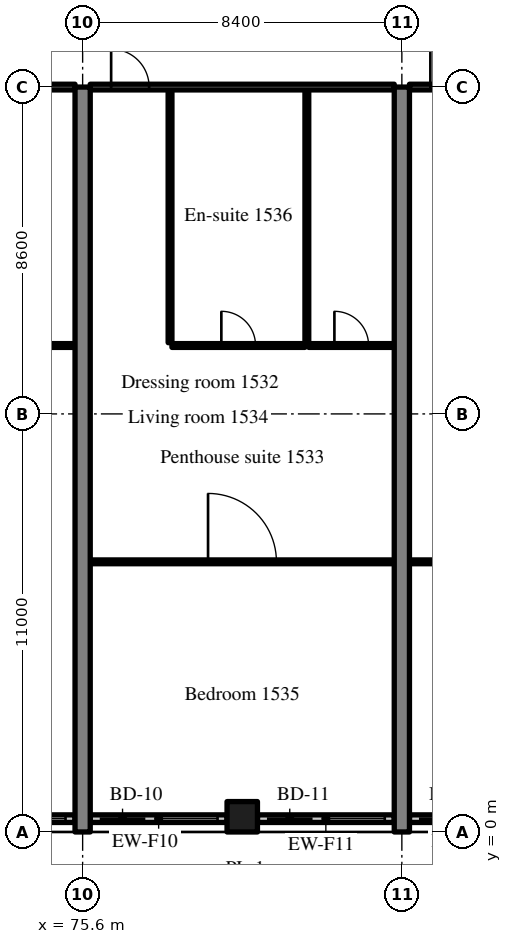
"""IFC4 building model, lengths in metres.
Left out: names, types, materials, properties, quantities, classifications, styles, units other than length and angle.
Written with IfcOpenShell. Run it as: python <this file> out.ifc"""

import sys

from ifc_helpers import new_model, si_unit, direction, frame, frame_2d, origin, origin_2d, place, context, subcontext, project, spatial, rectangle, extrude, source, transform, mapped, element, fill, save


model = new_model("IFC4")
c1 = context("Model", 3, precision=1e-05, world=origin(), true_north=direction((0.0, 1.0)))
c2 = subcontext(c1, "Body", "Model", "MODEL_VIEW")
j1 = project(units=[si_unit("LENGTHUNIT", "METRE"), si_unit("PLANEANGLEUNIT", "RADIAN")], contexts=[c1])
p1 = place(None, origin())
s1 = spatial("IfcSite", under=j1, at=p1, CompositionType="ELEMENT")
p2 = place(p1, origin())
s2 = spatial("IfcBuilding", under=s1, at=p2, CompositionType="ELEMENT")
p3 = place(p2, frame((0.0, 0.0, 65.8)))
s3 = spatial("IfcBuildingStorey", under=s2, at=p3, CompositionType="ELEMENT", Elevation=65.8)
m1 = source(origin(), c2, "Body", "SweptSolid", [
    extrude(rectangle(XDim=19.6, YDim=0.4, at=frame_2d((9.8, 0.0))), origin(), (0.0, 0.0, 1.0), 3.52),
])
for number, where, z_axis, x_axis in (
    (1, (75.6, 0.0, 0.0), (0.0, 0.0, 1.0), (0.0, 1.0, 0.0)),
    (2, (84.0, 0.0, 0.0), (0.0, 0.0, 1.0), (0.0, 1.0, 0.0)),
):
    element("IfcWall", number, at=place(p3, frame(where, z_axis=z_axis, x_axis=x_axis)), inside=s3, PredefinedType="SHEAR", context=c2, shape_type="MappedRepresentation", body=[
        mapped(m1, transform((0.0, 0.0, 0.0), scale=1.0)),
    ])
m2 = source(origin(), c2, "Body", "SweptSolid", [
    extrude(rectangle(XDim=0.8, YDim=0.8, at=origin_2d()), origin(), (0.0, 0.0, 1.0), 3.52),
])
p4 = place(p3, frame((79.8, 0.4, 0.0), z_axis=(0.0, 0.0, 1.0), x_axis=(1.0, 0.0, 0.0)))
e3 = element("IfcColumn", 3, at=p4, inside=s3, PredefinedType="COLUMN", context=c2, shape_type="MappedRepresentation", body=[
    mapped(m2, transform((0.0, 0.0, 0.0), scale=1.0)),
])
m3 = source(origin(), c2, "Body", "SweptSolid", [
    extrude(rectangle(XDim=3.6, YDim=0.2, at=frame_2d((1.8, 0.0))), origin(), (0.0, 0.0, 1.0), 2.82),
])
p5 = place(p3, frame((71.8, 0.35, 0.0), z_axis=(0.0, 0.0, 1.0), x_axis=(1.0, 0.0, 0.0)))
e4 = element("IfcWall", 4, at=p5, inside=s3, PredefinedType="SOLIDWALL", context=c2, shape_type="MappedRepresentation", body=[
    mapped(m3, transform((0.0, 0.0, 0.0), scale=1.0)),
])
m4 = source(origin(), c2, "Body", "SweptSolid", [
    extrude(rectangle(XDim=1.2, YDim=2.4, at=frame_2d((0.6, 1.2))), frame((0.0, 0.11, 0.0), z_axis=(0.0, -1.0, 0.0), x_axis=(1.0, 0.0, 0.0)), (0.0, 0.0, 1.0), 0.22),
])
p6 = place(p5, frame((0.25, 0.0, 0.0)))
e5 = element("IfcOpeningElement", 5, at=p6, cuts=e4, PredefinedType="OPENING", context=c2, shape_type="MappedRepresentation", body=[
    mapped(m4, transform((0.0, 0.0, 0.0), scale=1.0)),
])
m5 = source(origin(), c2, "Body", "SweptSolid", [
    extrude(rectangle(XDim=1.5, YDim=1.5, at=frame_2d((0.75, 0.75))), frame((0.0, 0.11, 0.0), z_axis=(0.0, -1.0, 0.0), x_axis=(1.0, 0.0, 0.0)), (0.0, 0.0, 1.0), 0.22),
])
p7 = place(p5, frame((1.85, 0.0, 0.9)))
e6 = element("IfcOpeningElement", 6, at=p7, cuts=e4, PredefinedType="OPENING", context=c2, shape_type="MappedRepresentation", body=[
    mapped(m5, transform((0.0, 0.0, 0.0), scale=1.0)),
])
p8 = place(p3, frame((75.8, 0.35, 0.0), z_axis=(0.0, 0.0, 1.0), x_axis=(1.0, 0.0, 0.0)))
e7 = element("IfcWall", 7, at=p8, inside=s3, PredefinedType="SOLIDWALL", context=c2, shape_type="MappedRepresentation", body=[
    mapped(m3, transform((0.0, 0.0, 0.0), scale=1.0)),
])
p9 = place(p8, frame((0.25, 0.0, 0.0)))
e8 = element("IfcOpeningElement", 8, at=p9, cuts=e7, PredefinedType="OPENING", context=c2, shape_type="MappedRepresentation", body=[
    mapped(m4, transform((0.0, 0.0, 0.0), scale=1.0)),
])
p10 = place(p8, frame((1.85, 0.0, 0.9)))
e9 = element("IfcOpeningElement", 9, at=p10, cuts=e7, PredefinedType="OPENING", context=c2, shape_type="MappedRepresentation", body=[
    mapped(m5, transform((0.0, 0.0, 0.0), scale=1.0)),
])
m6 = source(origin(), c2, "Body", "SweptSolid", [
    extrude(rectangle(XDim=3.6, YDim=0.2, at=frame_2d((1.8, 0.0))), origin(), (0.0, 0.0, 1.0), 2.82),
])
p11 = place(p3, frame((80.2, 0.35, 0.0), z_axis=(0.0, 0.0, 1.0), x_axis=(1.0, 0.0, 0.0)))
e10 = element("IfcWall", 10, at=p11, inside=s3, PredefinedType="SOLIDWALL", context=c2, shape_type="MappedRepresentation", body=[
    mapped(m6, transform((0.0, 0.0, 0.0), scale=1.0)),
])
p12 = place(p11, frame((0.25, 0.0, 0.0)))
e11 = element("IfcOpeningElement", 11, at=p12, cuts=e10, PredefinedType="OPENING", context=c2, shape_type="MappedRepresentation", body=[
    mapped(m4, transform((0.0, 0.0, 0.0), scale=1.0)),
])
p13 = place(p11, frame((1.85, 0.0, 0.9)))
e12 = element("IfcOpeningElement", 12, at=p13, cuts=e10, PredefinedType="OPENING", context=c2, shape_type="MappedRepresentation", body=[
    mapped(m5, transform((0.0, 0.0, 0.0), scale=1.0)),
])
p14 = place(p3, frame((84.2, 0.35, 0.0), z_axis=(0.0, 0.0, 1.0), x_axis=(1.0, 0.0, 0.0)))
e13 = element("IfcWall", 13, at=p14, inside=s3, PredefinedType="SOLIDWALL", context=c2, shape_type="MappedRepresentation", body=[
    mapped(m6, transform((0.0, 0.0, 0.0), scale=1.0)),
])
p15 = place(p14, frame((0.25, 0.0, 0.0)))
e14 = element("IfcOpeningElement", 14, at=p15, cuts=e13, PredefinedType="OPENING", context=c2, shape_type="MappedRepresentation", body=[
    mapped(m4, transform((0.0, 0.0, 0.0), scale=1.0)),
])
p16 = place(p14, frame((1.85, 0.0, 0.9)))
e15 = element("IfcOpeningElement", 15, at=p16, cuts=e13, PredefinedType="OPENING", context=c2, shape_type="MappedRepresentation", body=[
    mapped(m5, transform((0.0, 0.0, 0.0), scale=1.0)),
])
m7 = source(origin(), c2, "Body", "SweptSolid", [
    extrude(rectangle(XDim=2.25, YDim=0.1, at=frame_2d((1.125, 0.0))), origin(), (0.0, 0.0, 1.0), 3.52),
])
p17 = place(p3, frame((73.15, 12.8, 0.0), z_axis=(0.0, 0.0, 1.0), x_axis=(1.0, 0.0, 0.0)))
e16 = element("IfcWall", 16, at=p17, inside=s3, PredefinedType="PARTITIONING", context=c2, shape_type="MappedRepresentation", body=[
    mapped(m7, transform((0.0, 0.0, 0.0), scale=1.0)),
])
m8 = source(origin(), c2, "Body", "SweptSolid", [
    extrude(rectangle(XDim=0.9, YDim=2.1, at=frame_2d((0.45, 1.05))), frame((0.0, 0.06, 0.0), z_axis=(0.0, -1.0, 0.0), x_axis=(1.0, 0.0, 0.0)), (0.0, 0.0, 1.0), 0.12),
])
p18 = place(p17, frame((0.675, 0.0, 0.0)))
e17 = element("IfcOpeningElement", 17, at=p18, cuts=e16, PredefinedType="OPENING", context=c2, shape_type="MappedRepresentation", body=[
    mapped(m8, transform((0.0, 0.0, 0.0), scale=1.0)),
])
m9 = source(origin(), c2, "Body", "SweptSolid", [
    extrude(rectangle(XDim=8.0, YDim=0.15, at=frame_2d((4.0, 0.0))), origin(), (0.0, 0.0, 1.0), 2.82),
])
p19 = place(p3, frame((67.4, 19.6, 0.0), z_axis=(0.0, 0.0, 1.0), x_axis=(1.0, 0.0, 0.0)))
e18 = element("IfcWall", 18, at=p19, inside=s3, PredefinedType="PARTITIONING", context=c2, shape_type="MappedRepresentation", body=[
    mapped(m9, transform((0.0, 0.0, 0.0), scale=1.0)),
])
m10 = source(origin(), c2, "Body", "SweptSolid", [
    extrude(rectangle(XDim=1.0, YDim=2.1, at=frame_2d((0.5, 1.05))), frame((0.0, 0.085, 0.0), z_axis=(0.0, -1.0, 0.0), x_axis=(1.0, 0.0, 0.0)), (0.0, 0.0, 1.0), 0.17),
])
p20 = place(p19, frame((0.55, 0.0, 0.0)))
e19 = element("IfcOpeningElement", 19, at=p20, cuts=e18, PredefinedType="OPENING", context=c2, shape_type="MappedRepresentation", body=[
    mapped(m10, transform((0.0, 0.0, 0.0), scale=1.0)),
])
m11 = source(origin(), c2, "Body", "SweptSolid", [
    extrude(rectangle(XDim=6.65, YDim=0.1, at=frame_2d((3.325, 0.0))), origin(), (0.0, 0.0, 1.0), 3.52),
])
for number, where, z_axis, x_axis in (
    (20, (77.9, 12.875, 0.0), (0.0, 0.0, 1.0), (0.0, 1.0, 0.0)),
    (21, (81.5, 12.875, 0.0), (0.0, 0.0, 1.0), (0.0, 1.0, 0.0)),
):
    element("IfcWall", number, at=place(p3, frame(where, z_axis=z_axis, x_axis=x_axis)), inside=s3, PredefinedType="PARTITIONING", context=c2, shape_type="MappedRepresentation", body=[
        mapped(m11, transform((0.0, 0.0, 0.0), scale=1.0)),
    ])
m12 = source(origin(), c2, "Body", "SweptSolid", [
    extrude(rectangle(XDim=3.5, YDim=0.1, at=frame_2d((1.75, 0.0))), origin(), (0.0, 0.0, 1.0), 3.52),
])
p21 = place(p3, frame((77.95, 12.8, 0.0), z_axis=(0.0, 0.0, 1.0), x_axis=(1.0, 0.0, 0.0)))
e22 = element("IfcWall", 22, at=p21, inside=s3, PredefinedType="PARTITIONING", context=c2, shape_type="MappedRepresentation", body=[
    mapped(m12, transform((0.0, 0.0, 0.0), scale=1.0)),
])
p22 = place(p21, frame((1.3, 0.0, 0.0)))
e23 = element("IfcOpeningElement", 23, at=p22, cuts=e22, PredefinedType="OPENING", context=c2, shape_type="MappedRepresentation", body=[
    mapped(m8, transform((0.0, 0.0, 0.0), scale=1.0)),
])
p23 = place(p3, frame((81.55, 12.8, 0.0), z_axis=(0.0, 0.0, 1.0), x_axis=(1.0, 0.0, 0.0)))
e24 = element("IfcWall", 24, at=p23, inside=s3, PredefinedType="PARTITIONING", context=c2, shape_type="MappedRepresentation", body=[
    mapped(m7, transform((0.0, 0.0, 0.0), scale=1.0)),
])
p24 = place(p23, frame((0.675, 0.0, 0.0)))
e25 = element("IfcOpeningElement", 25, at=p24, cuts=e24, PredefinedType="OPENING", context=c2, shape_type="MappedRepresentation", body=[
    mapped(m8, transform((0.0, 0.0, 0.0), scale=1.0)),
])
m13 = source(origin(), c2, "Body", "SweptSolid", [
    extrude(rectangle(XDim=8.0, YDim=0.1, at=frame_2d((4.0, 0.0))), origin(), (0.0, 0.0, 1.0), 3.52),
])
p25 = place(p3, frame((75.8, 7.108, 0.0), z_axis=(0.0, 0.0, 1.0), x_axis=(1.0, 0.0, 0.0)))
e26 = element("IfcWall", 26, at=p25, inside=s3, PredefinedType="PARTITIONING", context=c2, shape_type="MappedRepresentation", body=[
    mapped(m13, transform((0.0, 0.0, 0.0), scale=1.0)),
])
m14 = source(origin(), c2, "Body", "SweptSolid", [
    extrude(rectangle(XDim=1.8, YDim=2.1, at=frame_2d((0.9, 1.05))), frame((0.0, 0.06, 0.0), z_axis=(0.0, -1.0, 0.0), x_axis=(1.0, 0.0, 0.0)), (0.0, 0.0, 1.0), 0.12),
])
p26 = place(p25, frame((3.1, 0.0, 0.0)))
e27 = element("IfcOpeningElement", 27, at=p26, cuts=e26, PredefinedType="OPENING", context=c2, shape_type="MappedRepresentation", body=[
    mapped(m14, transform((0.0, 0.0, 0.0), scale=1.0)),
])
p27 = place(p3, frame((75.8, 19.6, 0.0), z_axis=(0.0, 0.0, 1.0), x_axis=(1.0, 0.0, 0.0)))
e28 = element("IfcWall", 28, at=p27, inside=s3, PredefinedType="PARTITIONING", context=c2, shape_type="MappedRepresentation", body=[
    mapped(m9, transform((0.0, 0.0, 0.0), scale=1.0)),
])
p28 = place(p27, frame((0.55, 0.0, 0.0)))
e29 = element("IfcOpeningElement", 29, at=p28, cuts=e28, PredefinedType="OPENING", context=c2, shape_type="MappedRepresentation", body=[
    mapped(m10, transform((0.0, 0.0, 0.0), scale=1.0)),
])
p29 = place(p3, frame((84.2, 7.108, 0.0), z_axis=(0.0, 0.0, 1.0), x_axis=(1.0, 0.0, 0.0)))
e30 = element("IfcWall", 30, at=p29, inside=s3, PredefinedType="PARTITIONING", context=c2, shape_type="MappedRepresentation", body=[
    mapped(m13, transform((0.0, 0.0, 0.0), scale=1.0)),
])
p30 = place(p29, frame((3.1, 0.0, 0.0)))
e31 = element("IfcOpeningElement", 31, at=p30, cuts=e30, PredefinedType="OPENING", context=c2, shape_type="MappedRepresentation", body=[
    mapped(m14, transform((0.0, 0.0, 0.0), scale=1.0)),
])
p31 = place(p3, frame((84.2, 19.6, 0.0), z_axis=(0.0, 0.0, 1.0), x_axis=(1.0, 0.0, 0.0)))
e32 = element("IfcWall", 32, at=p31, inside=s3, PredefinedType="PARTITIONING", context=c2, shape_type="MappedRepresentation", body=[
    mapped(m9, transform((0.0, 0.0, 0.0), scale=1.0)),
])
p32 = place(p31, frame((0.55, 0.0, 0.0)))
e33 = element("IfcOpeningElement", 33, at=p32, cuts=e32, PredefinedType="OPENING", context=c2, shape_type="MappedRepresentation", body=[
    mapped(m10, transform((0.0, 0.0, 0.0), scale=1.0)),
])
m15 = source(origin(), c2, "Body", "SweptSolid", [
    extrude(rectangle(XDim=1.5, YDim=1.5, at=frame_2d((0.75, 0.75))), frame((0.0, 0.03, 0.0), z_axis=(0.0, -1.0, 0.0), x_axis=(1.0, 0.0, 0.0)), (0.0, 0.0, 1.0), 0.06),
])
p33 = place(p7, origin())
e34 = element("IfcWindow", 34, at=p33, inside=s3, PartitioningType="SINGLE_PANEL", PredefinedType="WINDOW", context=c2, shape_type="MappedRepresentation", body=[
    mapped(m15, transform((0.0, 0.0, 0.0), scale=1.0)),
])
fill(e6, e34)
m16 = source(origin(), c2, "Body", "SweptSolid", [
    extrude(rectangle(XDim=1.2, YDim=2.4, at=frame_2d((0.6, 1.2))), frame((0.0, 0.025, 0.0), z_axis=(0.0, -1.0, 0.0), x_axis=(1.0, 0.0, 0.0)), (0.0, 0.0, 1.0), 0.05),
])
p34 = place(p9, origin())
e35 = element("IfcDoor", 35, at=p34, inside=s3, OperationType="SLIDING_TO_RIGHT", PredefinedType="DOOR", context=c2, shape_type="MappedRepresentation", body=[
    mapped(m16, transform((0.0, 0.0, 0.0), scale=1.0)),
])
fill(e8, e35)
p35 = place(p10, origin())
e36 = element("IfcWindow", 36, at=p35, inside=s3, PartitioningType="SINGLE_PANEL", PredefinedType="WINDOW", context=c2, shape_type="MappedRepresentation", body=[
    mapped(m15, transform((0.0, 0.0, 0.0), scale=1.0)),
])
fill(e9, e36)
p36 = place(p12, origin())
e37 = element("IfcDoor", 37, at=p36, inside=s3, OperationType="SLIDING_TO_LEFT", PredefinedType="DOOR", context=c2, shape_type="MappedRepresentation", body=[
    mapped(m16, transform((0.0, 0.0, 0.0), scale=1.0)),
])
fill(e11, e37)
p37 = place(p13, origin())
e38 = element("IfcWindow", 38, at=p37, inside=s3, PartitioningType="SINGLE_PANEL", PredefinedType="WINDOW", context=c2, shape_type="MappedRepresentation", body=[
    mapped(m15, transform((0.0, 0.0, 0.0), scale=1.0)),
])
fill(e12, e38)
p38 = place(p15, origin())
e39 = element("IfcDoor", 39, at=p38, inside=s3, OperationType="SLIDING_TO_RIGHT", PredefinedType="DOOR", context=c2, shape_type="MappedRepresentation", body=[
    mapped(m16, transform((0.0, 0.0, 0.0), scale=1.0)),
])
fill(e14, e39)
m17 = source(origin(), c2, "Body", "SweptSolid", [
    extrude(rectangle(XDim=0.9, YDim=2.1, at=frame_2d((0.45, 1.05))), frame((0.0, 0.025, 0.0), z_axis=(0.0, -1.0, 0.0), x_axis=(1.0, 0.0, 0.0)), (0.0, 0.0, 1.0), 0.05),
])
p39 = place(p22, origin())
e40 = element("IfcDoor", 40, at=p39, inside=s3, OperationType="SINGLE_SWING_LEFT", PredefinedType="DOOR", context=c2, shape_type="MappedRepresentation", body=[
    mapped(m17, transform((0.0, 0.0, 0.0), scale=1.0)),
])
fill(e23, e40)
p40 = place(p24, origin())
e41 = element("IfcDoor", 41, at=p40, inside=s3, OperationType="SINGLE_SWING_LEFT", PredefinedType="DOOR", context=c2, shape_type="MappedRepresentation", body=[
    mapped(m17, transform((0.0, 0.0, 0.0), scale=1.0)),
])
fill(e25, e41)
m18 = source(origin(), c2, "Body", "SweptSolid", [
    extrude(rectangle(XDim=1.8, YDim=2.1, at=frame_2d((0.9, 1.05))), frame((0.0, 0.025, 0.0), z_axis=(0.0, -1.0, 0.0), x_axis=(1.0, 0.0, 0.0)), (0.0, 0.0, 1.0), 0.05),
])
p41 = place(p26, origin())
e42 = element("IfcDoor", 42, at=p41, inside=s3, OperationType="DOUBLE_DOOR_SINGLE_SWING", PredefinedType="DOOR", context=c2, shape_type="MappedRepresentation", body=[
    mapped(m18, transform((0.0, 0.0, 0.0), scale=1.0)),
])
fill(e27, e42)
m19 = source(origin(), c2, "Body", "SweptSolid", [
    extrude(rectangle(XDim=1.0, YDim=2.1, at=frame_2d((0.5, 1.05))), frame((0.0, 0.025, 0.0), z_axis=(0.0, -1.0, 0.0), x_axis=(1.0, 0.0, 0.0)), (0.0, 0.0, 1.0), 0.05),
])
p42 = place(p28, origin())
e43 = element("IfcDoor", 43, at=p42, inside=s3, OperationType="SINGLE_SWING_LEFT", PredefinedType="DOOR", context=c2, shape_type="MappedRepresentation", body=[
    mapped(m19, transform((0.0, 0.0, 0.0), scale=1.0)),
])
fill(e29, e43)
p43 = place(p32, origin())
e44 = element("IfcDoor", 44, at=p43, inside=s3, OperationType="SINGLE_SWING_LEFT", PredefinedType="DOOR", context=c2, shape_type="MappedRepresentation", body=[
    mapped(m19, transform((0.0, 0.0, 0.0), scale=1.0)),
])
fill(e33, e44)
save(model, sys.argv[1])
